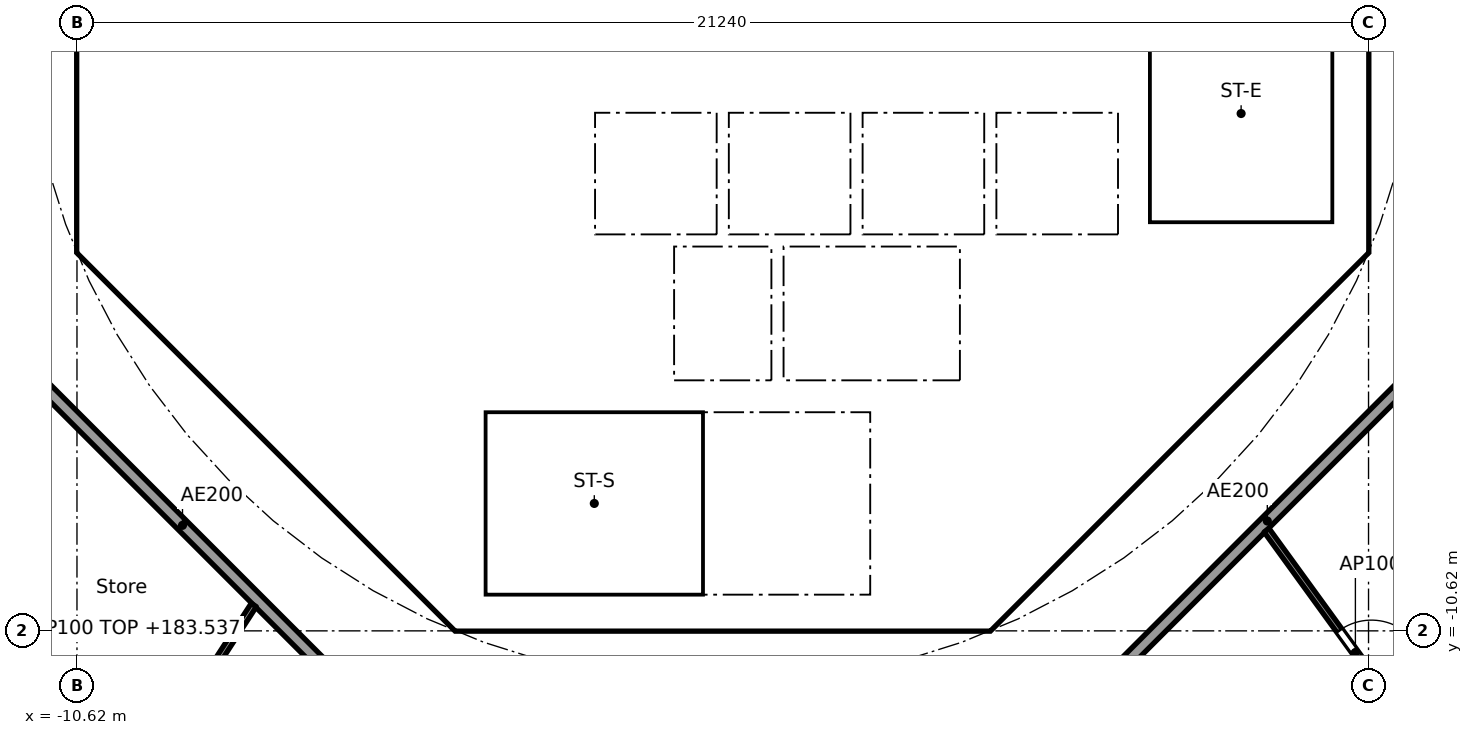
"""IFC4 building model, lengths in metres.
Left out: names, types, materials, properties, quantities, classifications, styles, units other than length and angle.
Written with IfcOpenShell. Run it as: python <this file> out.ifc"""

import sys

from ifc_helpers import new_model, si_unit, direction, frame, frame_2d, origin, place, context, subcontext, project, spatial, polyline, rectangle, outline, extrude, element, fill, save


model = new_model("IFC4")
c1 = context("Model", 3, precision=1e-05, world=origin(), true_north=direction((0.0, 1.0)))
c2 = subcontext(c1, "Body", "Model", "MODEL_VIEW")
j1 = project(units=[si_unit("LENGTHUNIT", "METRE"), si_unit("PLANEANGLEUNIT", "RADIAN")], contexts=[c1])
p1 = place(None, origin())
s1 = spatial("IfcSite", under=j1, at=p1, CompositionType="ELEMENT")
p2 = place(p1, origin())
s2 = spatial("IfcBuilding", under=s1, at=p2, CompositionType="ELEMENT")
p3 = place(p2, frame((0.0, 0.0, 180.7)))
s3 = spatial("IfcBuildingStorey", under=s2, at=p3, CompositionType="ELEMENT", Elevation=180.7)
p4 = place(p3, frame((-10.325, 3.801, 0.0), z_axis=(0.0, 0.0, 1.0), x_axis=(0.0, -1.0, 0.0)))
e1 = element("IfcWall", 1, at=p4, inside=s3, PredefinedType="SHEAR", context=c2, shape_type="SweptSolid", body=[
    extrude(rectangle(XDim=7.602, YDim=0.6, at=frame_2d((3.801, 0.0))), origin(), (0.0, 0.0, 1.0), 3.44),
])
p5 = place(p4, frame((0.651, 0.0, 0.0)))
e2 = element("IfcOpeningElement", 2, at=p5, cuts=e1, PredefinedType="OPENING", context=c2, shape_type="SweptSolid", body=[
    extrude(rectangle(XDim=1.5, YDim=2.1, at=frame_2d((0.75, 1.05))), frame((0.0, 0.31, 0.0), z_axis=(0.0, -1.0, 0.0), x_axis=(1.0, 0.0, 0.0)), (0.0, 0.0, 1.0), 0.62),
])
p6 = place(p4, frame((5.451, 0.0, 0.0)))
e3 = element("IfcOpeningElement", 3, at=p6, cuts=e1, PredefinedType="OPENING", context=c2, shape_type="SweptSolid", body=[
    extrude(rectangle(XDim=1.5, YDim=2.1, at=frame_2d((0.75, 1.05))), frame((0.0, 0.31, 0.0), z_axis=(0.0, -1.0, 0.0), x_axis=(1.0, 0.0, 0.0)), (0.0, 0.0, 1.0), 0.62),
])
p7 = place(p3, frame((-9.988, -4.613, 0.0), z_axis=(0.0, 0.0, 1.0), x_axis=(0.707106781187, -0.707106781187, 0.0)))
e4 = element("IfcWall", 4, at=p7, inside=s3, PredefinedType="SHEAR", context=c2, shape_type="SweptSolid", body=[
    extrude(rectangle(XDim=7.602, YDim=0.6, at=frame_2d((3.801, 0.0))), origin(), (0.0, 0.0, 1.0), 3.44),
])
p8 = place(p7, frame((6.151, 0.0, 0.0)))
e5 = element("IfcOpeningElement", 5, at=p8, cuts=e4, PredefinedType="OPENING", context=c2, shape_type="SweptSolid", body=[
    extrude(rectangle(XDim=1.1, YDim=2.1, at=frame_2d((0.55, 1.05))), frame((0.0, 0.31, 0.0), z_axis=(0.0, -1.0, 0.0), x_axis=(1.0, 0.0, 0.0)), (0.0, 0.0, 1.0), 0.62),
])
p9 = place(p3, frame((4.613, -9.988, 0.0), z_axis=(0.0, 0.0, 1.0), x_axis=(0.707106781187, 0.707106781187, 0.0)))
e6 = element("IfcWall", 6, at=p9, inside=s3, PredefinedType="SHEAR", context=c2, shape_type="SweptSolid", body=[
    extrude(rectangle(XDim=7.602, YDim=0.6, at=frame_2d((3.801, 0.0))), origin(), (0.0, 0.0, 1.0), 3.44),
])
p10 = place(p9, frame((3.201, 0.0, 0.0)))
e7 = element("IfcOpeningElement", 7, at=p10, cuts=e6, PredefinedType="OPENING", context=c2, shape_type="SweptSolid", body=[
    extrude(rectangle(XDim=1.2, YDim=2.1, at=frame_2d((0.6, 1.05))), frame((0.0, 0.31, 0.0), z_axis=(0.0, -1.0, 0.0), x_axis=(1.0, 0.0, 0.0)), (0.0, 0.0, 1.0), 0.62),
])
p11 = place(p3, frame((4.0, -10.025, 0.0), z_axis=(0.0, 0.0, 1.0), x_axis=(0.0, 1.0, 0.0)))
e8 = element("IfcWall", 8, at=p11, inside=s3, PredefinedType="SOLIDWALL", context=c2, shape_type="SweptSolid", body=[
    extrude(rectangle(XDim=3.0, YDim=0.2, at=frame_2d((1.5, 0.0))), origin(), (0.0, 0.0, 1.0), 3.44),
])
p12 = place(p11, frame((0.975, 0.0, 0.0)))
e9 = element("IfcOpeningElement", 9, at=p12, cuts=e8, PredefinedType="OPENING", context=c2, shape_type="SweptSolid", body=[
    extrude(rectangle(XDim=1.1, YDim=2.1, at=frame_2d((0.55, 1.05))), frame((0.0, 0.11, 0.0), z_axis=(0.0, -1.0, 0.0), x_axis=(1.0, 0.0, 0.0)), (0.0, 0.0, 1.0), 0.22),
])
p13 = place(p3, frame((-6.2, -7.827, 0.0), z_axis=(0.0, 0.0, 1.0), x_axis=(0.0, 1.0, 0.0)))
e10 = element("IfcWall", 10, at=p13, inside=s3, PredefinedType="PARTITIONING", context=c2, shape_type="SweptSolid", body=[
    extrude(rectangle(XDim=3.527, YDim=0.15, at=frame_2d((1.763, 0.0))), origin(), (0.0, 0.0, 1.0), 3.44),
])
p14 = place(p13, frame((1.276, 0.0, 0.0)))
e11 = element("IfcOpeningElement", 11, at=p14, cuts=e10, PredefinedType="OPENING", context=c2, shape_type="SweptSolid", body=[
    extrude(rectangle(XDim=0.9, YDim=2.1, at=frame_2d((0.45, 1.05))), frame((0.0, 0.085, 0.0), z_axis=(0.0, -1.0, 0.0), x_axis=(1.0, 0.0, 0.0)), (0.0, 0.0, 1.0), 0.17),
])
p15 = place(p3, frame((4.0, -6.5, 0.0), z_axis=(0.0, 0.0, 1.0), x_axis=(0.0, 1.0, 0.0)))
e12 = element("IfcWall", 12, at=p15, inside=s3, PredefinedType="SOLIDWALL", context=c2, shape_type="SweptSolid", body=[
    extrude(rectangle(XDim=2.2, YDim=0.2, at=frame_2d((1.1, 0.0))), origin(), (0.0, 0.0, 1.0), 3.44),
])
p16 = place(p15, frame((0.55, 0.0, 0.0)))
e13 = element("IfcOpeningElement", 13, at=p16, cuts=e12, PredefinedType="OPENING", context=c2, shape_type="SweptSolid", body=[
    extrude(rectangle(XDim=1.1, YDim=2.1, at=frame_2d((0.55, 1.05))), frame((0.0, 0.11, 0.0), z_axis=(0.0, -1.0, 0.0), x_axis=(1.0, 0.0, 0.0)), (0.0, 0.0, 1.0), 0.22),
])
p17 = place(p3, frame((-4.0, -6.5, 0.0), z_axis=(0.0, 0.0, 1.0), x_axis=(0.0, 1.0, 0.0)))
e14 = element("IfcWall", 14, at=p17, inside=s3, PredefinedType="SOLIDWALL", context=c2, shape_type="SweptSolid", body=[
    extrude(rectangle(XDim=2.2, YDim=0.2, at=frame_2d((1.1, 0.0))), origin(), (0.0, 0.0, 1.0), 3.44),
])
p18 = place(p17, frame((0.65, 0.0, 0.0)))
e15 = element("IfcOpeningElement", 15, at=p18, cuts=e14, PredefinedType="OPENING", context=c2, shape_type="SweptSolid", body=[
    extrude(rectangle(XDim=0.9, YDim=2.1, at=frame_2d((0.45, 1.05))), frame((0.0, 0.11, 0.0), z_axis=(0.0, -1.0, 0.0), x_axis=(1.0, 0.0, 0.0)), (0.0, 0.0, 1.0), 0.22),
])
p19 = place(p3, frame((-6.7, -2.0, 0.0), z_axis=(0.0, 0.0, 1.0), x_axis=(1.0, 0.0, 0.0)))
e16 = element("IfcWall", 16, at=p19, inside=s3, PredefinedType="SOLIDWALL", context=c2, shape_type="SweptSolid", body=[
    extrude(rectangle(XDim=13.4, YDim=0.2, at=frame_2d((6.7, 0.0))), origin(), (0.0, 0.0, 1.0), 3.44),
])
p20 = place(p19, frame((5.05, 0.0, 0.0)))
e17 = element("IfcOpeningElement", 17, at=p20, cuts=e16, PredefinedType="OPENING", context=c2, shape_type="SweptSolid", body=[
    extrude(rectangle(XDim=1.1, YDim=2.1, at=frame_2d((0.55, 1.05))), frame((0.0, 0.11, 0.0), z_axis=(0.0, -1.0, 0.0), x_axis=(1.0, 0.0, 0.0)), (0.0, 0.0, 1.0), 0.22),
])
p21 = place(p19, frame((7.25, 0.0, 0.0)))
e18 = element("IfcOpeningElement", 18, at=p21, cuts=e16, PredefinedType="OPENING", context=c2, shape_type="SweptSolid", body=[
    extrude(rectangle(XDim=1.1, YDim=2.1, at=frame_2d((0.55, 1.05))), frame((0.0, 0.11, 0.0), z_axis=(0.0, -1.0, 0.0), x_axis=(1.0, 0.0, 0.0)), (0.0, 0.0, 1.0), 0.22),
])
p22 = place(p19, frame((1.85, 0.0, 0.0)))
e19 = element("IfcOpeningElement", 19, at=p22, cuts=e16, PredefinedType="OPENING", context=c2, shape_type="SweptSolid", body=[
    extrude(rectangle(XDim=0.9, YDim=2.1, at=frame_2d((0.45, 1.05))), frame((0.0, 0.11, 0.0), z_axis=(0.0, -1.0, 0.0), x_axis=(1.0, 0.0, 0.0)), (0.0, 0.0, 1.0), 0.22),
])
p23 = place(p3, origin())
e20 = element("IfcWall", 20, at=p23, inside=s3, PredefinedType="SHEAR", context=c2, shape_type="SweptSolid", body=[
    extrude(outline(polyline([(-10.625, -3.801), (-10.025, -3.801), (-10.025, -4.152), (-9.776, -4.401), (-10.2, -4.825), (-10.625, -4.401), (-10.625, -3.801)])), origin(), (0.0, 0.0, 1.0), 3.44),
])
p24 = place(p3, origin())
e21 = element("IfcWall", 21, at=p24, inside=s3, PredefinedType="SHEAR", context=c2, shape_type="SweptSolid", body=[
    extrude(outline(polyline([(-4.152, -10.025), (4.152, -10.025), (4.401, -9.776), (4.825, -10.2), (4.401, -10.625), (-4.401, -10.625), (-4.825, -10.2), (-4.401, -9.776), (-4.152, -10.025)])), origin(), (0.0, 0.0, 1.0), 3.44),
])
p25 = place(p3, origin())
e22 = element("IfcWall", 22, at=p25, inside=s3, PredefinedType="SHEAR", context=c2, shape_type="SweptSolid", body=[
    extrude(outline(polyline([(9.776, -4.401), (10.025, -4.152), (10.025, -3.801), (10.025, 4.152), (9.776, 4.401), (10.2, 4.825), (10.625, 4.401), (10.625, -4.401), (10.2, -4.825), (9.776, -4.401)])), origin(), (0.0, 0.0, 1.0), 3.44),
])
p26 = place(p3, frame((-10.025, -4.0, 0.0), z_axis=(0.0, 0.0, 1.0), x_axis=(1.0, 0.0, 0.0)))
e23 = element("IfcWall", 23, at=p26, inside=s3, PredefinedType="PARTITIONING", context=c2, shape_type="SweptSolid", body=[
    extrude(rectangle(XDim=3.325, YDim=0.2, at=frame_2d((1.662, 0.0))), origin(), (0.0, 0.0, 1.0), 3.44),
])
for number, where, z_axis, x_axis in (
    (24, (-0.9, -6.5, 0.0), (0.0, 0.0, 1.0), (0.0, 1.0, 0.0)),
    (25, (0.9, -6.5, 0.0), (0.0, 0.0, 1.0), (0.0, 1.0, 0.0)),
):
    element("IfcWall", number, at=place(p3, frame(where, z_axis=z_axis, x_axis=x_axis)), inside=s3, PredefinedType="SOLIDWALL", context=c2, shape_type="SweptSolid", body=[
        extrude(rectangle(XDim=2.2, YDim=0.2, at=frame_2d((1.1, 0.0))), origin(), (0.0, 0.0, 1.0), 3.44),
    ])
p27 = place(p3, origin())
e26 = element("IfcWall", 26, at=p27, inside=s3, PredefinedType="SOLIDWALL", context=c2, shape_type="SweptSolid", body=[
    extrude(outline(polyline([(-6.7, -2.1), (-6.5, -2.1), (-6.5, -4.1), (-2.3, -4.1), (-2.3, -2.1), (-2.1, -2.1), (-2.1, -4.1), (-0.1, -4.1), (-0.1, -2.1), (0.1, -2.1), (0.1, -4.1), (2.1, -4.1), (2.1, -2.1), (2.3, -2.1), (2.3, -4.1), (4.3, -4.1), (4.3, -2.1), (4.5, -2.1), (4.5, -4.1), (6.5, -4.1), (6.5, -2.1), (6.7, -2.1), (6.7, -4.3), (-6.7, -4.3), (-6.7, -2.1)])), origin(), (0.0, 0.0, 1.0), 3.44),
])
p28 = place(p3, origin())
e27 = element("IfcWall", 27, at=p28, inside=s3, PredefinedType="SOLIDWALL", context=c2, shape_type="SweptSolid", body=[
    extrude(outline(polyline([(-3.9, -10.025), (-4.1, -10.025), (-4.1, -7.025), (-3.9, -7.025), (-3.9, -10.025)])), origin(), (0.0, 0.0, 1.0), 3.44),
])
p29 = place(p3, origin())
e28 = element("IfcWall", 28, at=p29, inside=s3, PredefinedType="SOLIDWALL", context=c2, shape_type="SweptSolid", body=[
    extrude(outline(polyline([(4.1, -7.025), (-4.1, -7.025), (-4.1, -6.5), (4.1, -6.5), (4.1, -7.025)])), origin(), (0.0, 0.0, 1.0), 3.44),
])
p30 = place(p3, origin())
e29 = element("IfcWall", 29, at=p30, inside=s3, PredefinedType="SOLIDWALL", context=c2, shape_type="SweptSolid", body=[
    extrude(outline(polyline([(7.025, -3.9), (6.7, -3.9), (6.7, 3.9), (7.025, 3.9), (7.025, -3.9)])), origin(), (0.0, 0.0, 1.0), 3.44),
])
p31 = place(p3, origin())
e30 = element("IfcWall", 30, at=p31, inside=s3, PredefinedType="SOLIDWALL", context=c2, shape_type="SweptSolid", body=[
    extrude(outline(polyline([(10.025, -4.1), (6.7, -4.1), (6.7, -3.9), (10.025, -3.9), (10.025, -4.1)])), origin(), (0.0, 0.0, 1.0), 3.44),
])
p32 = place(p3, frame((-12.635, -5.134, 0.0), z_axis=(0.0, 0.0, 1.0), x_axis=(0.707106781187, -0.707106781187, 0.0)))
e31 = element("IfcWall", 31, at=p32, inside=s3, PredefinedType="PARTITIONING", context=c2, shape_type="SweptSolid", body=[
    extrude(rectangle(XDim=10.609, YDim=0.2, at=frame_2d((5.305, 0.0))), origin(), (0.0, 0.0, 1.0), 3.44),
])
p33 = place(p3, frame((5.275, -12.494, 0.0), z_axis=(0.0, 0.0, 1.0), x_axis=(0.707106781187, 0.707106781187, 0.0)))
e32 = element("IfcWall", 32, at=p33, inside=s3, PredefinedType="PARTITIONING", context=c2, shape_type="SweptSolid", body=[
    extrude(rectangle(XDim=10.409, YDim=0.2, at=frame_2d((5.205, 0.0))), origin(), (0.0, 0.0, 1.0), 3.44),
])
p34 = place(p3, frame((-12.623, -9.653, 0.0), z_axis=(0.0, 0.0, 1.0), x_axis=(0.640297481347, -0.768127030758, 0.0)))
e33 = element("IfcWall", 33, at=p34, inside=s3, PredefinedType="PARTITIONING", context=c2, shape_type="SweptSolid", body=[
    extrude(rectangle(XDim=4.672, YDim=0.1, at=frame_2d((2.336, 0.0))), origin(), (0.0, 0.0, 1.0), 2.837),
])
p35 = place(p34, frame((3.029, 0.0, 0.0)))
e34 = element("IfcOpeningElement", 34, at=p35, cuts=e33, PredefinedType="OPENING", context=c2, shape_type="SweptSolid", body=[
    extrude(rectangle(XDim=0.9, YDim=2.1, at=frame_2d((0.45, 1.05))), frame((0.0, 0.06, 0.0), z_axis=(0.0, -1.0, 0.0), x_axis=(1.0, 0.0, 0.0)), (0.0, 0.0, 1.0), 0.12),
])
p36 = place(p3, frame((-7.712, -10.195, 0.0), z_axis=(0.0, 0.0, 1.0), x_axis=(-0.544170086001, -0.838974920663, 0.0)))
e35 = element("IfcWall", 35, at=p36, inside=s3, PredefinedType="PARTITIONING", context=c2, shape_type="SweptSolid", body=[
    extrude(rectangle(XDim=3.535, YDim=0.1, at=frame_2d((1.768, 0.0))), origin(), (0.0, 0.0, 1.0), 2.756),
])
p37 = place(p3, frame((8.943, -8.966, 0.0), z_axis=(0.0, 0.0, 1.0), x_axis=(0.587187896734, -0.809450661825, 0.0)))
e36 = element("IfcWall", 36, at=p37, inside=s3, PredefinedType="PARTITIONING", context=c2, shape_type="SweptSolid", body=[
    extrude(rectangle(XDim=4.975, YDim=0.1, at=frame_2d((2.487, 0.0))), origin(), (0.0, 0.0, 1.0), 2.756),
])
p38 = place(p37, frame((2.037, 0.0, 0.0)))
e37 = element("IfcOpeningElement", 37, at=p38, cuts=e36, PredefinedType="OPENING", context=c2, shape_type="SweptSolid", body=[
    extrude(rectangle(XDim=0.9, YDim=2.1, at=frame_2d((0.45, 1.05))), frame((0.0, 0.06, 0.0), z_axis=(0.0, -1.0, 0.0), x_axis=(1.0, 0.0, 0.0)), (0.0, 0.0, 1.0), 0.12),
])
p39 = place(p20, origin())
e38 = element("IfcDoor", 38, at=p39, inside=s3, OperationType="DOUBLE_DOOR_SLIDING", PredefinedType="DOOR", context=c2, shape_type="SweptSolid", body=[
    extrude(rectangle(XDim=1.1, YDim=2.1, at=frame_2d((0.55, 1.05))), frame((0.0, 0.025, 0.0), z_axis=(0.0, -1.0, 0.0), x_axis=(1.0, 0.0, 0.0)), (0.0, 0.0, 1.0), 0.05),
])
fill(e17, e38)
p40 = place(p21, origin())
e39 = element("IfcDoor", 39, at=p40, inside=s3, OperationType="DOUBLE_DOOR_SLIDING", PredefinedType="DOOR", context=c2, shape_type="SweptSolid", body=[
    extrude(rectangle(XDim=1.1, YDim=2.1, at=frame_2d((0.55, 1.05))), frame((0.0, 0.025, 0.0), z_axis=(0.0, -1.0, 0.0), x_axis=(1.0, 0.0, 0.0)), (0.0, 0.0, 1.0), 0.05),
])
fill(e18, e39)
p41 = place(p16, origin())
e40 = element("IfcDoor", 40, at=p41, inside=s3, OperationType="DOUBLE_DOOR_SLIDING", PredefinedType="DOOR", context=c2, shape_type="SweptSolid", body=[
    extrude(rectangle(XDim=1.1, YDim=2.1, at=frame_2d((0.55, 1.05))), frame((0.0, 0.025, 0.0), z_axis=(0.0, -1.0, 0.0), x_axis=(1.0, 0.0, 0.0)), (0.0, 0.0, 1.0), 0.05),
])
fill(e13, e40)
p42 = place(p12, origin())
e41 = element("IfcDoor", 41, at=p42, inside=s3, OperationType="SINGLE_SWING_RIGHT", PredefinedType="DOOR", context=c2, shape_type="SweptSolid", body=[
    extrude(rectangle(XDim=1.1, YDim=2.1, at=frame_2d((0.55, 1.05))), frame((0.0, 0.025, 0.0), z_axis=(0.0, -1.0, 0.0), x_axis=(1.0, 0.0, 0.0)), (0.0, 0.0, 1.0), 0.05),
])
fill(e9, e41)
p43 = place(p14, origin())
e42 = element("IfcDoor", 42, at=p43, inside=s3, OperationType="SINGLE_SWING_RIGHT", PredefinedType="DOOR", context=c2, shape_type="SweptSolid", body=[
    extrude(rectangle(XDim=0.9, YDim=2.1, at=frame_2d((0.45, 1.05))), frame((0.0, 0.025, 0.0), z_axis=(0.0, -1.0, 0.0), x_axis=(1.0, 0.0, 0.0)), (0.0, 0.0, 1.0), 0.05),
])
fill(e11, e42)
p44 = place(p18, frame((0.9, 0.0, 0.0), x_axis=(-1.0, 0.0, 0.0)))
e43 = element("IfcDoor", 43, at=p44, inside=s3, OperationType="SINGLE_SWING_RIGHT", PredefinedType="DOOR", context=c2, shape_type="SweptSolid", body=[
    extrude(rectangle(XDim=0.9, YDim=2.1, at=frame_2d((0.45, 1.05))), frame((0.0, 0.025, 0.0), z_axis=(0.0, -1.0, 0.0), x_axis=(1.0, 0.0, 0.0)), (0.0, 0.0, 1.0), 0.05),
])
fill(e15, e43)
p45 = place(p22, frame((0.9, 0.0, 0.0), x_axis=(-1.0, 0.0, 0.0)))
e44 = element("IfcDoor", 44, at=p45, inside=s3, OperationType="SINGLE_SWING_RIGHT", PredefinedType="DOOR", context=c2, shape_type="SweptSolid", body=[
    extrude(rectangle(XDim=0.9, YDim=2.1, at=frame_2d((0.45, 1.05))), frame((0.0, 0.025, 0.0), z_axis=(0.0, -1.0, 0.0), x_axis=(1.0, 0.0, 0.0)), (0.0, 0.0, 1.0), 0.05),
])
fill(e19, e44)
p46 = place(p10, origin())
e45 = element("IfcDoor", 45, at=p46, inside=s3, OperationType="SINGLE_SWING_LEFT", PredefinedType="DOOR", context=c2, shape_type="SweptSolid", body=[
    extrude(rectangle(XDim=1.2, YDim=2.1, at=frame_2d((0.6, 1.05))), frame((0.0, 0.025, 0.0), z_axis=(0.0, -1.0, 0.0), x_axis=(1.0, 0.0, 0.0)), (0.0, 0.0, 1.0), 0.05),
])
fill(e7, e45)
p47 = place(p6, origin())
e46 = element("IfcDoor", 46, at=p47, inside=s3, OperationType="DOUBLE_DOOR_SINGLE_SWING", PredefinedType="DOOR", context=c2, shape_type="SweptSolid", body=[
    extrude(rectangle(XDim=1.5, YDim=2.1, at=frame_2d((0.75, 1.05))), frame((0.0, 0.025, 0.0), z_axis=(0.0, -1.0, 0.0), x_axis=(1.0, 0.0, 0.0)), (0.0, 0.0, 1.0), 0.05),
])
fill(e3, e46)
p48 = place(p8, origin())
e47 = element("IfcDoor", 47, at=p48, inside=s3, OperationType="SINGLE_SWING_LEFT", PredefinedType="DOOR", context=c2, shape_type="SweptSolid", body=[
    extrude(rectangle(XDim=1.1, YDim=2.1, at=frame_2d((0.55, 1.05))), frame((0.0, 0.025, 0.0), z_axis=(0.0, -1.0, 0.0), x_axis=(1.0, 0.0, 0.0)), (0.0, 0.0, 1.0), 0.05),
])
fill(e5, e47)
p49 = place(p38, origin())
e48 = element("IfcDoor", 48, at=p49, inside=s3, OperationType="SINGLE_SWING_RIGHT", PredefinedType="DOOR", context=c2, shape_type="SweptSolid", body=[
    extrude(rectangle(XDim=0.9, YDim=2.1, at=frame_2d((0.45, 1.05))), frame((0.0, 0.025, 0.0), z_axis=(0.0, -1.0, 0.0), x_axis=(1.0, 0.0, 0.0)), (0.0, 0.0, 1.0), 0.05),
])
fill(e37, e48)
save(model, sys.argv[1])
